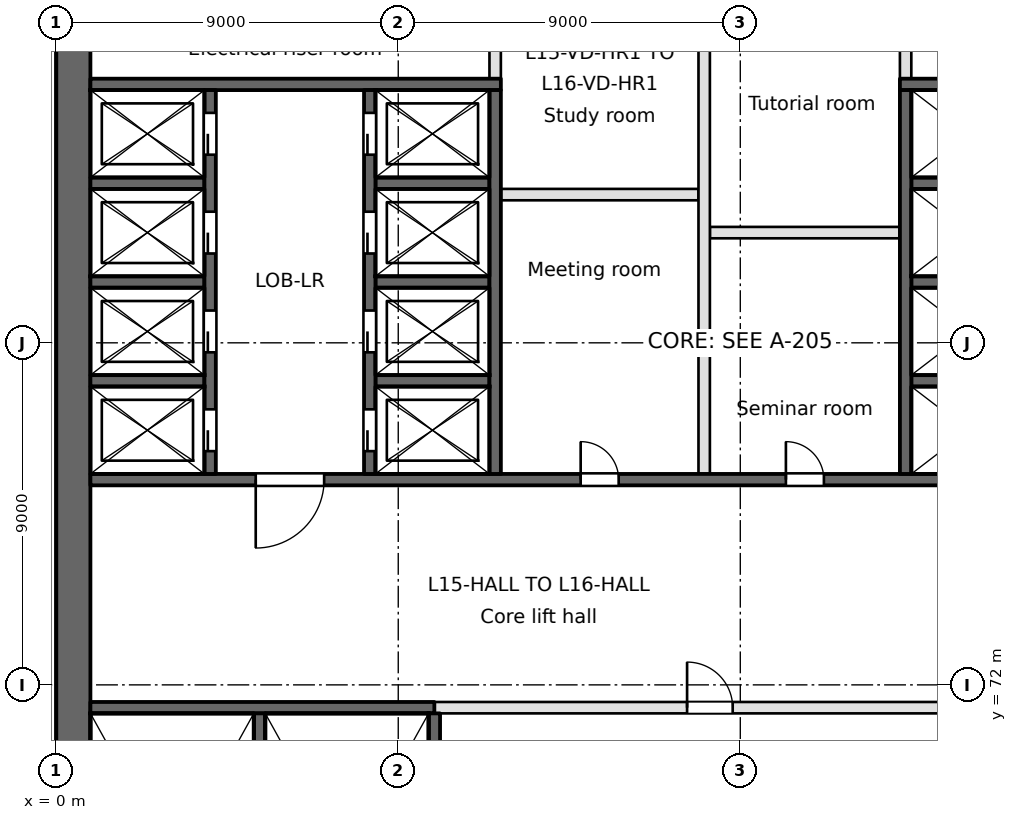
"""IFC4 building model, lengths in metres.
Left out: names, types, materials, properties, quantities, classifications, styles, units other than length and angle.
Written with IfcOpenShell. Run it as: python <this file> out.ifc"""

import sys

from ifc_helpers import new_model, si_unit, direction, frame, frame_2d, origin, place, context, subcontext, project, spatial, rectangle, extrude, element, fill, save


model = new_model("IFC4")
c1 = context("Model", 3, precision=1e-05, world=origin(), true_north=direction((0.0, 1.0)))
c2 = subcontext(c1, "Body", "Model", "MODEL_VIEW")
j1 = project(units=[si_unit("LENGTHUNIT", "METRE"), si_unit("PLANEANGLEUNIT", "RADIAN")], contexts=[c1])
p1 = place(None, origin())
s1 = spatial("IfcSite", under=j1, at=p1, CompositionType="ELEMENT")
p2 = place(p1, origin())
s2 = spatial("IfcBuilding", under=s1, at=p2, CompositionType="ELEMENT")
p3 = place(p2, frame((0.0, 0.0, 65.4)))
s3 = spatial("IfcBuildingStorey", under=s2, at=p3, CompositionType="ELEMENT", Elevation=65.4)
p4 = place(p3, frame((0.45, 94.5, 0.0), z_axis=(0.0, 0.0, 1.0), x_axis=(0.0, -1.0, 0.0)))
e1 = element("IfcWall", 1, at=p4, inside=s3, PredefinedType="SHEAR", context=c2, shape_type="SweptSolid", body=[
    extrude(rectangle(XDim=66.187, YDim=0.9, at=frame_2d((33.094, 0.0))), origin(), (0.0, 0.0, 1.0), 3.7),
])
p5 = place(p3, frame((0.9, 71.4, -0.4), z_axis=(0.0, 0.0, 1.0), x_axis=(1.0, 0.0, 0.0)))
e2 = element("IfcWall", 2, at=p5, inside=s3, PredefinedType="SOLIDWALL", context=c2, shape_type="SweptSolid", body=[
    extrude(rectangle(XDim=9.05, YDim=0.3, at=frame_2d((4.525, 0.0))), origin(), (0.0, 0.0, 1.0), 3.7),
])
p6 = place(p3, frame((9.95, 71.4, 0.0), z_axis=(0.0, 0.0, 1.0), x_axis=(1.0, 0.0, 0.0)))
e3 = element("IfcWall", 3, at=p6, inside=s3, PredefinedType="PARTITIONING", context=c2, shape_type="SweptSolid", body=[
    extrude(rectangle(XDim=17.65, YDim=0.3, at=frame_2d((8.825, 0.0))), origin(), (0.0, 0.0, 1.0), 3.3),
])
p7 = place(p6, frame((15.1, 0.0, 0.0)))
e4 = element("IfcOpeningElement", 4, at=p7, cuts=e3, PredefinedType="OPENING", context=c2, shape_type="SweptSolid", body=[
    extrude(rectangle(XDim=1.8, YDim=2.1, at=frame_2d((0.9, 1.05))), frame((0.0, 0.15, 0.0), z_axis=(0.0, -1.0, 0.0), x_axis=(1.0, 0.0, 0.0)), (0.0, 0.0, 1.0), 0.3),
])
p8 = place(p6, frame((6.65, 0.0, 0.0)))
e5 = element("IfcOpeningElement", 5, at=p8, cuts=e3, PredefinedType="OPENING", context=c2, shape_type="SweptSolid", body=[
    extrude(rectangle(XDim=1.2, YDim=2.1, at=frame_2d((0.6, 1.05))), frame((0.0, 0.15, 0.0), z_axis=(0.0, -1.0, 0.0), x_axis=(1.0, 0.0, 0.0)), (0.0, 0.0, 1.0), 0.3),
])
p9 = place(p3, frame((0.9, 77.4, -0.4), z_axis=(0.0, 0.0, 1.0), x_axis=(1.0, 0.0, 0.0)))
e6 = element("IfcWall", 6, at=p9, inside=s3, PredefinedType="SOLIDWALL", context=c2, shape_type="SweptSolid", body=[
    extrude(rectangle(XDim=28.95, YDim=0.3, at=frame_2d((14.475, 0.0))), origin(), (0.0, 0.0, 1.0), 3.7),
])
p10 = place(p9, frame((4.35, 0.0, 0.4)))
e7 = element("IfcOpeningElement", 7, at=p10, cuts=e6, PredefinedType="OPENING", context=c2, shape_type="SweptSolid", body=[
    extrude(rectangle(XDim=1.8, YDim=2.1, at=frame_2d((0.9, 1.05))), frame((0.0, 0.15, 0.0), z_axis=(0.0, -1.0, 0.0), x_axis=(1.0, 0.0, 0.0)), (0.0, 0.0, 1.0), 0.3),
])
p11 = place(p9, frame((25.95, 0.0, 0.4)))
e8 = element("IfcOpeningElement", 8, at=p11, cuts=e6, PredefinedType="OPENING", context=c2, shape_type="SweptSolid", body=[
    extrude(rectangle(XDim=1.8, YDim=2.1, at=frame_2d((0.9, 1.05))), frame((0.0, 0.15, 0.0), z_axis=(0.0, -1.0, 0.0), x_axis=(1.0, 0.0, 0.0)), (0.0, 0.0, 1.0), 0.3),
])
p12 = place(p9, frame((12.9, 0.0, 0.4)))
e9 = element("IfcOpeningElement", 9, at=p12, cuts=e6, PredefinedType="OPENING", context=c2, shape_type="SweptSolid", body=[
    extrude(rectangle(XDim=1.0, YDim=2.1, at=frame_2d((0.5, 1.05))), frame((0.0, 0.15, 0.0), z_axis=(0.0, -1.0, 0.0), x_axis=(1.0, 0.0, 0.0)), (0.0, 0.0, 1.0), 0.3),
])
p13 = place(p9, frame((18.3, 0.0, 0.4)))
e10 = element("IfcOpeningElement", 10, at=p13, cuts=e6, PredefinedType="OPENING", context=c2, shape_type="SweptSolid", body=[
    extrude(rectangle(XDim=1.0, YDim=2.1, at=frame_2d((0.5, 1.05))), frame((0.0, 0.15, 0.0), z_axis=(0.0, -1.0, 0.0), x_axis=(1.0, 0.0, 0.0)), (0.0, 0.0, 1.0), 0.3),
])
for number, where, z_axis, x_axis in (
    (11, (0.9, 80.0, -0.4), (0.0, 0.0, 1.0), (1.0, 0.0, 0.0)),
    (12, (8.4, 80.0, -0.4), (0.0, 0.0, 1.0), (1.0, 0.0, 0.0)),
    (13, (22.5, 80.0, -0.4), (0.0, 0.0, 1.0), (1.0, 0.0, 0.0)),
    (14, (0.9, 82.6, -0.4), (0.0, 0.0, 1.0), (1.0, 0.0, 0.0)),
    (15, (8.4, 82.6, -0.4), (0.0, 0.0, 1.0), (1.0, 0.0, 0.0)),
    (16, (22.5, 82.6, -0.4), (0.0, 0.0, 1.0), (1.0, 0.0, 0.0)),
):
    element("IfcWall", number, at=place(p3, frame(where, z_axis=z_axis, x_axis=x_axis)), inside=s3, PredefinedType="SOLIDWALL", context=c2, shape_type="SweptSolid", body=[
        extrude(rectangle(XDim=3.0, YDim=0.3, at=frame_2d((1.5, 0.0))), origin(), (0.0, 0.0, 1.0), 3.7),
    ])
p14 = place(p3, frame((17.2, 83.9, 0.0), z_axis=(0.0, 0.0, 1.0), x_axis=(1.0, 0.0, 0.0)))
e17 = element("IfcWall", 17, at=p14, inside=s3, PredefinedType="PARTITIONING", context=c2, shape_type="SweptSolid", body=[
    extrude(rectangle(XDim=5.0, YDim=0.3, at=frame_2d((2.5, 0.0))), origin(), (0.0, 0.0, 1.0), 3.3),
])
p15 = place(p3, frame((11.7, 84.9, 0.0), z_axis=(0.0, 0.0, 1.0), x_axis=(1.0, 0.0, 0.0)))
e18 = element("IfcWall", 18, at=p15, inside=s3, PredefinedType="PARTITIONING", context=c2, shape_type="SweptSolid", body=[
    extrude(rectangle(XDim=5.2, YDim=0.3, at=frame_2d((2.6, 0.0))), origin(), (0.0, 0.0, 1.0), 3.3),
])
for number, where, z_axis, x_axis in (
    (19, (0.9, 85.2, -0.4), (0.0, 0.0, 1.0), (1.0, 0.0, 0.0)),
    (20, (8.4, 85.2, -0.4), (0.0, 0.0, 1.0), (1.0, 0.0, 0.0)),
    (21, (22.5, 85.2, -0.4), (0.0, 0.0, 1.0), (1.0, 0.0, 0.0)),
):
    element("IfcWall", number, at=place(p3, frame(where, z_axis=z_axis, x_axis=x_axis)), inside=s3, PredefinedType="SOLIDWALL", context=c2, shape_type="SweptSolid", body=[
        extrude(rectangle(XDim=3.0, YDim=0.3, at=frame_2d((1.5, 0.0))), origin(), (0.0, 0.0, 1.0), 3.7),
    ])
p16 = place(p3, frame((0.9, 87.8, -0.4), z_axis=(0.0, 0.0, 1.0), x_axis=(1.0, 0.0, 0.0)))
e22 = element("IfcWall", 22, at=p16, inside=s3, PredefinedType="SOLIDWALL", context=c2, shape_type="SweptSolid", body=[
    extrude(rectangle(XDim=10.8, YDim=0.3, at=frame_2d((5.4, 0.0))), origin(), (0.0, 0.0, 1.0), 3.7),
])
p17 = place(p3, frame((22.2, 87.8, -0.4), z_axis=(0.0, 0.0, 1.0), x_axis=(1.0, 0.0, 0.0)))
e23 = element("IfcWall", 23, at=p17, inside=s3, PredefinedType="SOLIDWALL", context=c2, shape_type="SweptSolid", body=[
    extrude(rectangle(XDim=7.8, YDim=0.3, at=frame_2d((3.9, 0.0))), origin(), (0.0, 0.0, 1.0), 3.7),
])
p18 = place(p3, frame((4.05, 77.55, -0.4), z_axis=(0.0, 0.0, 1.0), x_axis=(0.0, 1.0, 0.0)))
e24 = element("IfcWall", 24, at=p18, inside=s3, PredefinedType="SOLIDWALL", context=c2, shape_type="SweptSolid", body=[
    extrude(rectangle(XDim=10.1, YDim=0.3, at=frame_2d((5.05, 0.0))), origin(), (0.0, 0.0, 1.0), 3.7),
])
p19 = place(p18, frame((0.6, 0.0, 0.4)))
e25 = element("IfcOpeningElement", 25, at=p19, cuts=e24, PredefinedType="OPENING", context=c2, shape_type="SweptSolid", body=[
    extrude(rectangle(XDim=1.1, YDim=2.1, at=frame_2d((0.55, 1.05))), frame((0.0, 0.15, 0.0), z_axis=(0.0, -1.0, 0.0), x_axis=(1.0, 0.0, 0.0)), (0.0, 0.0, 1.0), 0.3),
])
p20 = place(p18, frame((3.2, 0.0, 0.4)))
e26 = element("IfcOpeningElement", 26, at=p20, cuts=e24, PredefinedType="OPENING", context=c2, shape_type="SweptSolid", body=[
    extrude(rectangle(XDim=1.1, YDim=2.1, at=frame_2d((0.55, 1.05))), frame((0.0, 0.15, 0.0), z_axis=(0.0, -1.0, 0.0), x_axis=(1.0, 0.0, 0.0)), (0.0, 0.0, 1.0), 0.3),
])
p21 = place(p18, frame((5.8, 0.0, 0.4)))
e27 = element("IfcOpeningElement", 27, at=p21, cuts=e24, PredefinedType="OPENING", context=c2, shape_type="SweptSolid", body=[
    extrude(rectangle(XDim=1.1, YDim=2.1, at=frame_2d((0.55, 1.05))), frame((0.0, 0.15, 0.0), z_axis=(0.0, -1.0, 0.0), x_axis=(1.0, 0.0, 0.0)), (0.0, 0.0, 1.0), 0.3),
])
p22 = place(p18, frame((8.4, 0.0, 0.4)))
e28 = element("IfcOpeningElement", 28, at=p22, cuts=e24, PredefinedType="OPENING", context=c2, shape_type="SweptSolid", body=[
    extrude(rectangle(XDim=1.1, YDim=2.1, at=frame_2d((0.55, 1.05))), frame((0.0, 0.15, 0.0), z_axis=(0.0, -1.0, 0.0), x_axis=(1.0, 0.0, 0.0)), (0.0, 0.0, 1.0), 0.3),
])
p23 = place(p3, frame((5.35, 63.5, -0.4), z_axis=(0.0, 0.0, 1.0), x_axis=(0.0, 1.0, 0.0)))
e29 = element("IfcWall", 29, at=p23, inside=s3, PredefinedType="SOLIDWALL", context=c2, shape_type="SweptSolid", body=[
    extrude(rectangle(XDim=7.75, YDim=0.3, at=frame_2d((3.875, 0.0))), origin(), (0.0, 0.0, 1.0), 3.7),
])
p24 = place(p3, frame((8.25, 77.55, -0.4), z_axis=(0.0, 0.0, 1.0), x_axis=(0.0, 1.0, 0.0)))
e30 = element("IfcWall", 30, at=p24, inside=s3, PredefinedType="SOLIDWALL", context=c2, shape_type="SweptSolid", body=[
    extrude(rectangle(XDim=10.1, YDim=0.3, at=frame_2d((5.05, 0.0))), origin(), (0.0, 0.0, 1.0), 3.7),
])
p25 = place(p24, frame((0.6, 0.0, 0.4)))
e31 = element("IfcOpeningElement", 31, at=p25, cuts=e30, PredefinedType="OPENING", context=c2, shape_type="SweptSolid", body=[
    extrude(rectangle(XDim=1.1, YDim=2.1, at=frame_2d((0.55, 1.05))), frame((0.0, 0.15, 0.0), z_axis=(0.0, -1.0, 0.0), x_axis=(1.0, 0.0, 0.0)), (0.0, 0.0, 1.0), 0.3),
])
p26 = place(p24, frame((3.2, 0.0, 0.4)))
e32 = element("IfcOpeningElement", 32, at=p26, cuts=e30, PredefinedType="OPENING", context=c2, shape_type="SweptSolid", body=[
    extrude(rectangle(XDim=1.1, YDim=2.1, at=frame_2d((0.55, 1.05))), frame((0.0, 0.15, 0.0), z_axis=(0.0, -1.0, 0.0), x_axis=(1.0, 0.0, 0.0)), (0.0, 0.0, 1.0), 0.3),
])
p27 = place(p24, frame((5.8, 0.0, 0.4)))
e33 = element("IfcOpeningElement", 33, at=p27, cuts=e30, PredefinedType="OPENING", context=c2, shape_type="SweptSolid", body=[
    extrude(rectangle(XDim=1.1, YDim=2.1, at=frame_2d((0.55, 1.05))), frame((0.0, 0.15, 0.0), z_axis=(0.0, -1.0, 0.0), x_axis=(1.0, 0.0, 0.0)), (0.0, 0.0, 1.0), 0.3),
])
p28 = place(p24, frame((8.4, 0.0, 0.4)))
e34 = element("IfcOpeningElement", 34, at=p28, cuts=e30, PredefinedType="OPENING", context=c2, shape_type="SweptSolid", body=[
    extrude(rectangle(XDim=1.1, YDim=2.1, at=frame_2d((0.55, 1.05))), frame((0.0, 0.15, 0.0), z_axis=(0.0, -1.0, 0.0), x_axis=(1.0, 0.0, 0.0)), (0.0, 0.0, 1.0), 0.3),
])
p29 = place(p3, frame((9.95, 63.5, -0.4), z_axis=(0.0, 0.0, 1.0), x_axis=(0.0, 1.0, 0.0)))
e35 = element("IfcWall", 35, at=p29, inside=s3, PredefinedType="SOLIDWALL", context=c2, shape_type="SweptSolid", body=[
    extrude(rectangle(XDim=7.75, YDim=0.3, at=frame_2d((3.875, 0.0))), origin(), (0.0, 0.0, 1.0), 3.7),
])
p30 = place(p3, frame((11.55, 77.55, -0.4), z_axis=(0.0, 0.0, 1.0), x_axis=(0.0, 1.0, 0.0)))
e36 = element("IfcWall", 36, at=p30, inside=s3, PredefinedType="SOLIDWALL", context=c2, shape_type="SweptSolid", body=[
    extrude(rectangle(XDim=10.1, YDim=0.3, at=frame_2d((5.05, 0.0))), origin(), (0.0, 0.0, 1.0), 3.7),
])
p31 = place(p3, frame((11.55, 87.95, 0.0), z_axis=(0.0, 0.0, 1.0), x_axis=(0.0, 1.0, 0.0)))
e37 = element("IfcWall", 37, at=p31, inside=s3, PredefinedType="PARTITIONING", context=c2, shape_type="SweptSolid", body=[
    extrude(rectangle(XDim=2.55, YDim=0.3, at=frame_2d((1.275, 0.0))), origin(), (0.0, 0.0, 1.0), 3.3),
])
p32 = place(p3, frame((17.05, 77.55, 0.0), z_axis=(0.0, 0.0, 1.0), x_axis=(0.0, 1.0, 0.0)))
e38 = element("IfcWall", 38, at=p32, inside=s3, PredefinedType="PARTITIONING", context=c2, shape_type="SweptSolid", body=[
    extrude(rectangle(XDim=12.95, YDim=0.3, at=frame_2d((6.475, 0.0))), origin(), (0.0, 0.0, 1.0), 3.3),
])
p33 = place(p3, frame((22.35, 77.55, -0.4), z_axis=(0.0, 0.0, 1.0), x_axis=(0.0, 1.0, 0.0)))
e39 = element("IfcWall", 39, at=p33, inside=s3, PredefinedType="SOLIDWALL", context=c2, shape_type="SweptSolid", body=[
    extrude(rectangle(XDim=10.1, YDim=0.3, at=frame_2d((5.05, 0.0))), origin(), (0.0, 0.0, 1.0), 3.7),
])
p34 = place(p3, frame((22.35, 87.95, 0.0), z_axis=(0.0, 0.0, 1.0), x_axis=(0.0, 1.0, 0.0)))
e40 = element("IfcWall", 40, at=p34, inside=s3, PredefinedType="PARTITIONING", context=c2, shape_type="SweptSolid", body=[
    extrude(rectangle(XDim=2.55, YDim=0.3, at=frame_2d((1.275, 0.0))), origin(), (0.0, 0.0, 1.0), 3.3),
])
p35 = place(p19, origin())
e41 = element("IfcDoor", 41, at=p35, inside=s3, OperationType="SLIDING_TO_RIGHT", PredefinedType="DOOR", context=c2, shape_type="SweptSolid", body=[
    extrude(rectangle(XDim=1.1, YDim=2.1, at=frame_2d((0.55, 1.05))), frame((0.0, 0.025, 0.0), z_axis=(0.0, -1.0, 0.0), x_axis=(1.0, 0.0, 0.0)), (0.0, 0.0, 1.0), 0.05),
])
fill(e25, e41)
p36 = place(p20, origin())
e42 = element("IfcDoor", 42, at=p36, inside=s3, OperationType="SLIDING_TO_LEFT", PredefinedType="DOOR", context=c2, shape_type="SweptSolid", body=[
    extrude(rectangle(XDim=1.1, YDim=2.1, at=frame_2d((0.55, 1.05))), frame((0.0, 0.025, 0.0), z_axis=(0.0, -1.0, 0.0), x_axis=(1.0, 0.0, 0.0)), (0.0, 0.0, 1.0), 0.05),
])
fill(e26, e42)
p37 = place(p21, origin())
e43 = element("IfcDoor", 43, at=p37, inside=s3, OperationType="SLIDING_TO_RIGHT", PredefinedType="DOOR", context=c2, shape_type="SweptSolid", body=[
    extrude(rectangle(XDim=1.1, YDim=2.1, at=frame_2d((0.55, 1.05))), frame((0.0, 0.025, 0.0), z_axis=(0.0, -1.0, 0.0), x_axis=(1.0, 0.0, 0.0)), (0.0, 0.0, 1.0), 0.05),
])
fill(e27, e43)
p38 = place(p22, origin())
e44 = element("IfcDoor", 44, at=p38, inside=s3, OperationType="SLIDING_TO_LEFT", PredefinedType="DOOR", context=c2, shape_type="SweptSolid", body=[
    extrude(rectangle(XDim=1.1, YDim=2.1, at=frame_2d((0.55, 1.05))), frame((0.0, 0.025, 0.0), z_axis=(0.0, -1.0, 0.0), x_axis=(1.0, 0.0, 0.0)), (0.0, 0.0, 1.0), 0.05),
])
fill(e28, e44)
p39 = place(p25, origin())
e45 = element("IfcDoor", 45, at=p39, inside=s3, OperationType="SLIDING_TO_RIGHT", PredefinedType="DOOR", context=c2, shape_type="SweptSolid", body=[
    extrude(rectangle(XDim=1.1, YDim=2.1, at=frame_2d((0.55, 1.05))), frame((0.0, 0.025, 0.0), z_axis=(0.0, -1.0, 0.0), x_axis=(1.0, 0.0, 0.0)), (0.0, 0.0, 1.0), 0.05),
])
fill(e31, e45)
p40 = place(p26, origin())
e46 = element("IfcDoor", 46, at=p40, inside=s3, OperationType="SLIDING_TO_LEFT", PredefinedType="DOOR", context=c2, shape_type="SweptSolid", body=[
    extrude(rectangle(XDim=1.1, YDim=2.1, at=frame_2d((0.55, 1.05))), frame((0.0, 0.025, 0.0), z_axis=(0.0, -1.0, 0.0), x_axis=(1.0, 0.0, 0.0)), (0.0, 0.0, 1.0), 0.05),
])
fill(e32, e46)
p41 = place(p27, origin())
e47 = element("IfcDoor", 47, at=p41, inside=s3, OperationType="SLIDING_TO_RIGHT", PredefinedType="DOOR", context=c2, shape_type="SweptSolid", body=[
    extrude(rectangle(XDim=1.1, YDim=2.1, at=frame_2d((0.55, 1.05))), frame((0.0, 0.025, 0.0), z_axis=(0.0, -1.0, 0.0), x_axis=(1.0, 0.0, 0.0)), (0.0, 0.0, 1.0), 0.05),
])
fill(e33, e47)
p42 = place(p28, origin())
e48 = element("IfcDoor", 48, at=p42, inside=s3, OperationType="SLIDING_TO_LEFT", PredefinedType="DOOR", context=c2, shape_type="SweptSolid", body=[
    extrude(rectangle(XDim=1.1, YDim=2.1, at=frame_2d((0.55, 1.05))), frame((0.0, 0.025, 0.0), z_axis=(0.0, -1.0, 0.0), x_axis=(1.0, 0.0, 0.0)), (0.0, 0.0, 1.0), 0.05),
])
fill(e34, e48)
p43 = place(p10, frame((1.8, 0.0, 0.0), z_axis=(0.0, 0.0, 1.0), x_axis=(-1.0, 0.0, 0.0)))
e49 = element("IfcDoor", 49, at=p43, inside=s3, OperationType="SINGLE_SWING_RIGHT", PredefinedType="DOOR", context=c2, shape_type="SweptSolid", body=[
    extrude(rectangle(XDim=1.8, YDim=2.1, at=frame_2d((0.9, 1.05))), frame((0.0, 0.025, 0.0), z_axis=(0.0, -1.0, 0.0), x_axis=(1.0, 0.0, 0.0)), (0.0, 0.0, 1.0), 0.05),
])
fill(e7, e49)
p44 = place(p8, origin())
e50 = element("IfcDoor", 50, at=p44, inside=s3, OperationType="SINGLE_SWING_LEFT", PredefinedType="DOOR", context=c2, shape_type="SweptSolid", body=[
    extrude(rectangle(XDim=1.2, YDim=2.1, at=frame_2d((0.6, 1.05))), frame((0.0, 0.025, 0.0), z_axis=(0.0, -1.0, 0.0), x_axis=(1.0, 0.0, 0.0)), (0.0, 0.0, 1.0), 0.05),
])
fill(e5, e50)
p45 = place(p12, origin())
e51 = element("IfcDoor", 51, at=p45, inside=s3, OperationType="SINGLE_SWING_LEFT", PredefinedType="DOOR", context=c2, shape_type="SweptSolid", body=[
    extrude(rectangle(XDim=1.0, YDim=2.1, at=frame_2d((0.5, 1.05))), frame((0.0, 0.025, 0.0), z_axis=(0.0, -1.0, 0.0), x_axis=(1.0, 0.0, 0.0)), (0.0, 0.0, 1.0), 0.05),
])
fill(e9, e51)
p46 = place(p13, origin())
e52 = element("IfcDoor", 52, at=p46, inside=s3, OperationType="SINGLE_SWING_LEFT", PredefinedType="DOOR", context=c2, shape_type="SweptSolid", body=[
    extrude(rectangle(XDim=1.0, YDim=2.1, at=frame_2d((0.5, 1.05))), frame((0.0, 0.025, 0.0), z_axis=(0.0, -1.0, 0.0), x_axis=(1.0, 0.0, 0.0)), (0.0, 0.0, 1.0), 0.05),
])
fill(e10, e52)
save(model, sys.argv[1])
